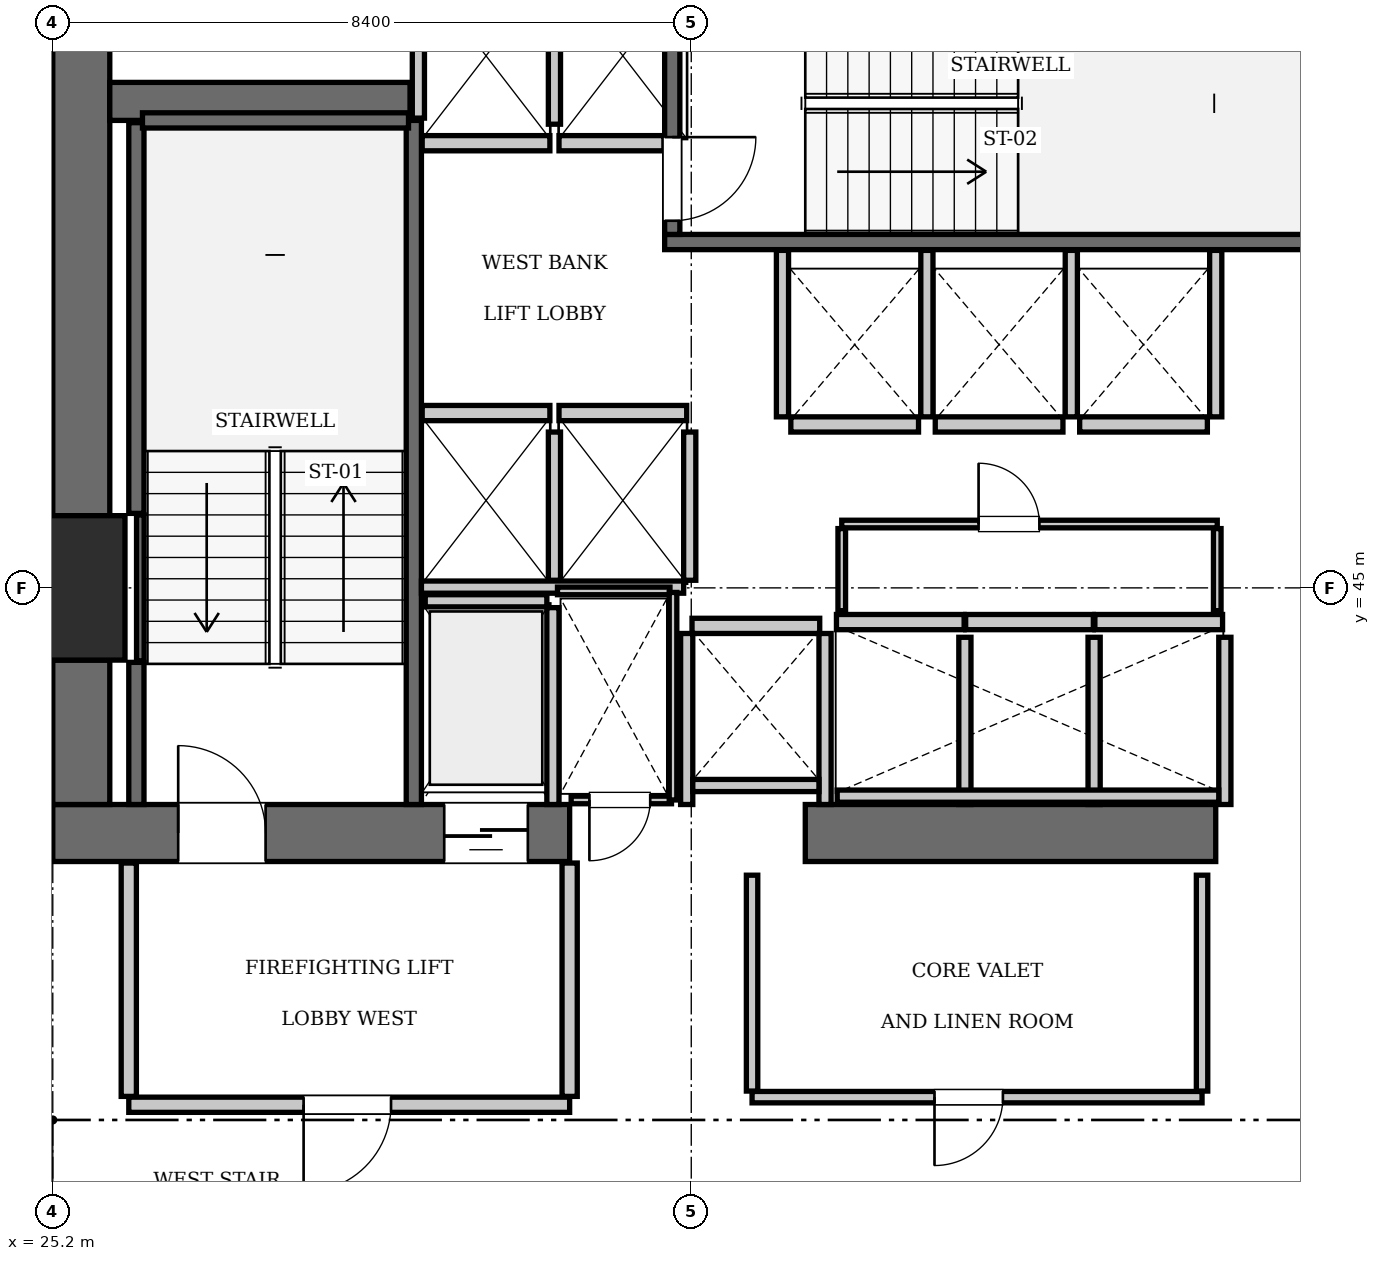
"""IFC4 building model, lengths in metres.
Left out: names, types, materials, properties, quantities, classifications, styles, units other than length and angle.
Written with IfcOpenShell. Run it as: python <this file> out.ifc"""

import sys

from ifc_helpers import new_model, si_unit, direction, frame, frame_2d, origin, origin_2d, place, context, subcontext, project, spatial, rectangle, extrude, element, fill, save


model = new_model("IFC4")
c1 = context("Model", 3, precision=1e-05, world=origin(), true_north=direction((0.0, 1.0)))
c2 = subcontext(c1, "Body", "Model", "MODEL_VIEW")
j1 = project(units=[si_unit("LENGTHUNIT", "METRE"), si_unit("PLANEANGLEUNIT", "RADIAN")], contexts=[c1])
p1 = place(None, origin())
s1 = spatial("IfcSite", under=j1, at=p1, CompositionType="ELEMENT")
p2 = place(p1, origin())
s2 = spatial("IfcBuilding", under=s1, at=p2, CompositionType="ELEMENT")
p3 = place(p2, frame((0.0, 0.0, 127.4)))
s3 = spatial("IfcBuildingStorey", under=s2, at=p3, CompositionType="ELEMENT", Elevation=127.4)
p4 = place(p3, frame((25.2, 45.0, 0.0), z_axis=(0.0, 0.0, 1.0), x_axis=(1.0, 0.0, 0.0)))
e1 = element("IfcColumn", 1, at=p4, inside=s3, PredefinedType="COLUMN", context=c2, shape_type="SweptSolid", body=[
    extrude(rectangle(XDim=1.9, YDim=1.9, at=origin_2d()), origin(), (0.0, 0.0, 1.0), 3.85),
])
p5 = place(p3, frame((25.2, 41.775, 0.0), z_axis=(0.0, 0.0, 1.0), x_axis=(1.0, 0.0, 0.0)))
e2 = element("IfcWall", 2, at=p5, inside=s3, PredefinedType="SHEAR", context=c2, shape_type="SweptSolid", body=[
    extrude(rectangle(XDim=6.8, YDim=0.75, at=frame_2d((3.4, 0.0))), origin(), (0.0, 0.0, 1.0), 3.85),
])
p6 = place(p5, frame((1.65, 0.0, 0.0)))
e3 = element("IfcOpeningElement", 3, at=p6, cuts=e2, PredefinedType="OPENING", context=c2, shape_type="SweptSolid", body=[
    extrude(rectangle(XDim=1.15, YDim=2.15, at=frame_2d((0.575, 1.075))), frame((0.0, 0.385, 0.0), z_axis=(0.0, -1.0, 0.0), x_axis=(1.0, 0.0, 0.0)), (0.0, 0.0, 1.0), 0.77),
])
p7 = place(p5, frame((5.15, 0.0, 0.0)))
e4 = element("IfcOpeningElement", 4, at=p7, cuts=e2, PredefinedType="OPENING", context=c2, shape_type="SweptSolid", body=[
    extrude(rectangle(XDim=1.1, YDim=2.2, at=frame_2d((0.55, 1.1))), frame((0.0, 0.385, 0.0), z_axis=(0.0, -1.0, 0.0), x_axis=(1.0, 0.0, 0.0)), (0.0, 0.0, 1.0), 0.77),
])
p8 = place(p3, frame((35.1, 41.775, 0.0), z_axis=(0.0, 0.0, 1.0), x_axis=(1.0, 0.0, 0.0)))
e5 = element("IfcWall", 5, at=p8, inside=s3, PredefinedType="SHEAR", context=c2, shape_type="SweptSolid", body=[
    extrude(rectangle(XDim=5.4, YDim=0.75, at=frame_2d((2.7, 0.0))), origin(), (0.0, 0.0, 1.0), 3.85),
])
p9 = place(p3, frame((25.575, 42.15, 0.0), z_axis=(0.0, 0.0, 1.0), x_axis=(0.0, 1.0, 0.0)))
e6 = element("IfcWall", 6, at=p9, inside=s3, PredefinedType="SHEAR", context=c2, shape_type="SweptSolid", body=[
    extrude(rectangle(XDim=1.9, YDim=0.75, at=frame_2d((0.95, 0.0))), origin(), (0.0, 0.0, 1.0), 3.85),
])
p10 = place(p3, frame((25.575, 45.95, 0.0), z_axis=(0.0, 0.0, 1.0), x_axis=(0.0, 1.0, 0.0)))
e7 = element("IfcWall", 7, at=p10, inside=s3, PredefinedType="SHEAR", context=c2, shape_type="SweptSolid", body=[
    extrude(rectangle(XDim=7.3, YDim=0.75, at=frame_2d((3.65, 0.0))), origin(), (0.0, 0.0, 1.0), 3.85),
])
p11 = place(p3, frame((25.95, 51.4, 0.0), z_axis=(0.0, 0.0, 1.0), x_axis=(1.0, 0.0, 0.0)))
e8 = element("IfcWall", 8, at=p11, inside=s3, PredefinedType="SHEAR", context=c2, shape_type="SweptSolid", body=[
    extrude(rectangle(XDim=3.95, YDim=0.5, at=frame_2d((1.975, 0.0))), origin(), (0.0, 0.0, 1.0), 3.85),
])
p12 = place(p3, frame((29.95, 42.15, 0.0), z_axis=(0.0, 0.0, 1.0), x_axis=(0.0, 1.0, 0.0)))
e9 = element("IfcWall", 9, at=p12, inside=s3, PredefinedType="SOLIDWALL", context=c2, shape_type="SweptSolid", body=[
    extrude(rectangle(XDim=9.0, YDim=0.2, at=frame_2d((4.5, 0.0))), origin(), (0.0, 0.0, 1.0), 3.61),
])
p13 = place(p3, frame((26.3, 42.15, 0.0), z_axis=(0.0, 0.0, 1.0), x_axis=(0.0, 1.0, 0.0)))
e10 = element("IfcWall", 10, at=p13, inside=s3, PredefinedType="SOLIDWALL", context=c2, shape_type="SweptSolid", body=[
    extrude(rectangle(XDim=1.87, YDim=0.2, at=frame_2d((0.935, 0.0))), origin(), (0.0, 0.0, 1.0), 3.61),
])
p14 = place(p3, frame((26.3, 45.98, 0.0), z_axis=(0.0, 0.0, 1.0), x_axis=(0.0, 1.0, 0.0)))
e11 = element("IfcWall", 11, at=p14, inside=s3, PredefinedType="SOLIDWALL", context=c2, shape_type="SweptSolid", body=[
    extrude(rectangle(XDim=5.14, YDim=0.2, at=frame_2d((2.57, 0.0))), origin(), (0.0, 0.0, 1.0), 3.61),
])
p15 = place(p3, frame((26.38, 51.15, 0.0), z_axis=(0.0, 0.0, 1.0), x_axis=(1.0, 0.0, 0.0)))
e12 = element("IfcWall", 12, at=p15, inside=s3, PredefinedType="SOLIDWALL", context=c2, shape_type="SweptSolid", body=[
    extrude(rectangle(XDim=3.5, YDim=0.2, at=frame_2d((1.75, 0.0))), origin(), (0.0, 0.0, 1.0), 3.61),
])
p16 = place(p3, frame((26.352, 44.04, 0.0), z_axis=(0.0, 0.0, 1.0), x_axis=(0.0, 1.0, 0.0)))
e13 = element("IfcWall", 13, at=p16, inside=s3, PredefinedType="SOLIDWALL", context=c2, shape_type="SweptSolid", body=[
    extrude(rectangle(XDim=1.92, YDim=0.1, at=frame_2d((0.96, 0.0))), origin(), (0.0, 0.0, 1.0), 3.61),
])
p17 = place(p3, frame((33.25, 49.55, 0.0), z_axis=(0.0, 0.0, 1.0), x_axis=(1.0, 0.0, 0.0)))
e14 = element("IfcWall", 14, at=p17, inside=s3, PredefinedType="SOLIDWALL", context=c2, shape_type="SweptSolid", body=[
    extrude(rectangle(XDim=9.1, YDim=0.2, at=frame_2d((4.55, 0.0))), origin(), (0.0, 0.0, 1.0), 3.61),
])
p18 = place(p3, frame((33.35, 49.65, 0.0), z_axis=(0.0, 0.0, 1.0), x_axis=(0.0, 1.0, 0.0)))
e15 = element("IfcWall", 15, at=p18, inside=s3, PredefinedType="SOLIDWALL", context=c2, shape_type="SweptSolid", body=[
    extrude(rectangle(XDim=3.6, YDim=0.2, at=frame_2d((1.8, 0.0))), origin(), (0.0, 0.0, 1.0), 3.61),
])
p19 = place(p18, frame((0.18, 0.0, 0.0)))
e16 = element("IfcOpeningElement", 16, at=p19, cuts=e15, PredefinedType="OPENING", context=c2, shape_type="SweptSolid", body=[
    extrude(rectangle(XDim=1.1, YDim=2.15, at=frame_2d((0.55, 1.075))), frame((0.0, 0.11, 0.0), z_axis=(0.0, -1.0, 0.0), x_axis=(1.0, 0.0, 0.0)), (0.0, 0.0, 1.0), 0.22),
])
for number, where, z_axis, x_axis in (
    (17, (30.06, 47.3, 0.0), (0.0, 0.0, 1.0), (1.0, 0.0, 0.0)),
    (18, (31.86, 47.3, 0.0), (0.0, 0.0, 1.0), (1.0, 0.0, 0.0)),
    (19, (30.06, 50.85, 0.0), (0.0, 0.0, 1.0), (1.0, 0.0, 0.0)),
):
    element("IfcWall", number, at=place(p3, frame(where, z_axis=z_axis, x_axis=x_axis)), inside=s3, PredefinedType="SOLIDWALL", context=c2, shape_type="SweptSolid", body=[
        extrude(rectangle(XDim=1.68, YDim=0.2, at=frame_2d((0.84, 0.0))), origin(), (0.0, 0.0, 1.0), 3.61),
    ])
p20 = place(p3, frame((31.86, 50.85, 0.0), z_axis=(0.0, 0.0, 1.0), x_axis=(1.0, 0.0, 0.0)))
e20 = element("IfcWall", 20, at=p20, inside=s3, PredefinedType="SOLIDWALL", context=c2, shape_type="SweptSolid", body=[
    extrude(rectangle(XDim=1.38, YDim=0.2, at=frame_2d((0.69, 0.0))), origin(), (0.0, 0.0, 1.0), 3.61),
])
for number, where, z_axis, x_axis in (
    (21, (35.51, 44.55, 0.0), (0.0, 0.0, 1.0), (1.0, 0.0, 0.0)),
    (22, (37.21, 44.55, 0.0), (0.0, 0.0, 1.0), (1.0, 0.0, 0.0)),
):
    element("IfcWall", number, at=place(p3, frame(where, z_axis=z_axis, x_axis=x_axis)), inside=s3, PredefinedType="SOLIDWALL", context=c2, shape_type="SweptSolid", body=[
        extrude(rectangle(XDim=1.68, YDim=0.2, at=frame_2d((0.84, 0.0))), origin(), (0.0, 0.0, 1.0), 3.61),
    ])
for number, where, z_axis, x_axis in (
    (23, (38.91, 44.55, 0.0), (0.0, 0.0, 1.0), (1.0, 0.0, 0.0)),
    (24, (34.91, 47.15, 0.0), (0.0, 0.0, 1.0), (1.0, 0.0, 0.0)),
):
    element("IfcWall", number, at=place(p3, frame(where, z_axis=z_axis, x_axis=x_axis)), inside=s3, PredefinedType="SOLIDWALL", context=c2, shape_type="SweptSolid", body=[
        extrude(rectangle(XDim=1.68, YDim=0.2, at=frame_2d((0.84, 0.0))), origin(), (0.0, 0.0, 1.0), 3.61),
    ])
for number, where, z_axis, x_axis in (
    (25, (36.81, 47.15, 0.0), (0.0, 0.0, 1.0), (1.0, 0.0, 0.0)),
    (26, (38.71, 47.15, 0.0), (0.0, 0.0, 1.0), (1.0, 0.0, 0.0)),
    (27, (33.61, 44.5, 0.0), (0.0, 0.0, 1.0), (1.0, 0.0, 0.0)),
):
    element("IfcWall", number, at=place(p3, frame(where, z_axis=z_axis, x_axis=x_axis)), inside=s3, PredefinedType="SOLIDWALL", context=c2, shape_type="SweptSolid", body=[
        extrude(rectangle(XDim=1.68, YDim=0.2, at=frame_2d((0.84, 0.0))), origin(), (0.0, 0.0, 1.0), 3.61),
    ])
p21 = place(p3, frame((30.1, 44.83, 0.0), z_axis=(0.0, 0.0, 1.0), x_axis=(1.0, 0.0, 0.0)))
e28 = element("IfcWall", 28, at=p21, inside=s3, PredefinedType="SOLIDWALL", context=c2, shape_type="SweptSolid", body=[
    extrude(rectangle(XDim=1.6, YDim=0.16, at=frame_2d((0.8, 0.0))), origin(), (0.0, 0.0, 1.0), 3.61),
])
p22 = place(p3, frame((31.78, 42.15, 0.0), z_axis=(0.0, 0.0, 1.0), x_axis=(0.0, 1.0, 0.0)))
e29 = element("IfcWall", 29, at=p22, inside=s3, PredefinedType="SOLIDWALL", context=c2, shape_type="SweptSolid", body=[
    extrude(rectangle(XDim=2.59, YDim=0.16, at=frame_2d((1.295, 0.0))), origin(), (0.0, 0.0, 1.0), 3.61),
])
for number, where, z_axis, x_axis in (
    (30, (31.8, 45.1, 0.0), (0.0, 0.0, 1.0), (0.0, 1.0, 0.0)),
    (31, (33.58, 45.1, 0.0), (0.0, 0.0, 1.0), (0.0, 1.0, 0.0)),
):
    element("IfcWall", number, at=place(p3, frame(where, z_axis=z_axis, x_axis=x_axis)), inside=s3, PredefinedType="SOLIDWALL", context=c2, shape_type="SweptSolid", body=[
        extrude(rectangle(XDim=1.95, YDim=0.16, at=frame_2d((0.975, 0.0))), origin(), (0.0, 0.0, 1.0), 3.61),
    ])
p23 = place(p3, frame((30.05, 45.01, 0.0), z_axis=(0.0, 0.0, 1.0), x_axis=(1.0, 0.0, 0.0)))
e32 = element("IfcWall", 32, at=p23, inside=s3, PredefinedType="SOLIDWALL", context=c2, shape_type="SweptSolid", body=[
    extrude(rectangle(XDim=3.45, YDim=0.16, at=frame_2d((1.725, 0.0))), origin(), (0.0, 0.0, 1.0), 3.61),
])
p24 = place(p3, frame((30.01, 51.18, 0.0), z_axis=(0.0, 0.0, 1.0), x_axis=(0.0, 1.0, 0.0)))
e33 = element("IfcWall", 33, at=p24, inside=s3, PredefinedType="SOLIDWALL", context=c2, shape_type="SweptSolid", body=[
    extrude(rectangle(XDim=2.07, YDim=0.16, at=frame_2d((1.035, 0.0))), origin(), (0.0, 0.0, 1.0), 3.61),
])
p25 = place(p3, frame((31.8, 51.1, 0.0), z_axis=(0.0, 0.0, 1.0), x_axis=(0.0, 1.0, 0.0)))
e34 = element("IfcWall", 34, at=p25, inside=s3, PredefinedType="SOLIDWALL", context=c2, shape_type="SweptSolid", body=[
    extrude(rectangle(XDim=2.15, YDim=0.16, at=frame_2d((1.075, 0.0))), origin(), (0.0, 0.0, 1.0), 3.61),
])
for number, where, z_axis, x_axis in (
    (35, (37.2, 42.15, 0.0), (0.0, 0.0, 1.0), (0.0, 1.0, 0.0)),
    (36, (38.9, 42.15, 0.0), (0.0, 0.0, 1.0), (0.0, 1.0, 0.0)),
    (37, (40.62, 42.15, 0.0), (0.0, 0.0, 1.0), (0.0, 1.0, 0.0)),
):
    element("IfcWall", number, at=place(p3, frame(where, z_axis=z_axis, x_axis=x_axis)), inside=s3, PredefinedType="SOLIDWALL", context=c2, shape_type="SweptSolid", body=[
        extrude(rectangle(XDim=2.2, YDim=0.16, at=frame_2d((1.1, 0.0))), origin(), (0.0, 0.0, 1.0), 3.61),
    ])
p26 = place(p3, frame((35.52, 42.26, 0.0), z_axis=(0.0, 0.0, 1.0), x_axis=(1.0, 0.0, 0.0)))
e38 = element("IfcWall", 38, at=p26, inside=s3, PredefinedType="SOLIDWALL", context=c2, shape_type="SweptSolid", body=[
    extrude(rectangle(XDim=5.02, YDim=0.16, at=frame_2d((2.51, 0.0))), origin(), (0.0, 0.0, 1.0), 3.61),
])
for number, where, z_axis, x_axis in (
    (39, (34.8, 47.25, 0.0), (0.0, 0.0, 1.0), (0.0, 1.0, 0.0)),
    (40, (36.7, 47.25, 0.0), (0.0, 0.0, 1.0), (0.0, 1.0, 0.0)),
    (41, (38.6, 47.25, 0.0), (0.0, 0.0, 1.0), (0.0, 1.0, 0.0)),
    (42, (40.5, 47.25, 0.0), (0.0, 0.0, 1.0), (0.0, 1.0, 0.0)),
):
    element("IfcWall", number, at=place(p3, frame(where, z_axis=z_axis, x_axis=x_axis)), inside=s3, PredefinedType="SOLIDWALL", context=c2, shape_type="SweptSolid", body=[
        extrude(rectangle(XDim=2.19, YDim=0.16, at=frame_2d((1.095, 0.0))), origin(), (0.0, 0.0, 1.0), 3.61),
    ])
for number, where, z_axis, x_axis in (
    (43, (33.54, 42.15, 0.0), (0.0, 0.0, 1.0), (0.0, 1.0, 0.0)),
    (44, (35.36, 42.15, 0.0), (0.0, 0.0, 1.0), (0.0, 1.0, 0.0)),
):
    element("IfcWall", number, at=place(p3, frame(where, z_axis=z_axis, x_axis=x_axis)), inside=s3, PredefinedType="SOLIDWALL", context=c2, shape_type="SweptSolid", body=[
        extrude(rectangle(XDim=2.25, YDim=0.16, at=frame_2d((1.125, 0.0))), origin(), (0.0, 0.0, 1.0), 3.61),
    ])
p27 = place(p3, frame((33.62, 42.4, 0.0), z_axis=(0.0, 0.0, 1.0), x_axis=(1.0, 0.0, 0.0)))
e45 = element("IfcWall", 45, at=p27, inside=s3, PredefinedType="SOLIDWALL", context=c2, shape_type="SweptSolid", body=[
    extrude(rectangle(XDim=1.66, YDim=0.16, at=frame_2d((0.83, 0.0))), origin(), (0.0, 0.0, 1.0), 3.61),
])
p28 = place(p3, frame((26.2, 38.2, 0.0), z_axis=(0.0, 0.0, 1.0), x_axis=(1.0, 0.0, 0.0)))
e46 = element("IfcWall", 46, at=p28, inside=s3, PredefinedType="PARTITIONING", context=c2, shape_type="SweptSolid", body=[
    extrude(rectangle(XDim=5.8, YDim=0.2, at=frame_2d((2.9, 0.0))), origin(), (0.0, 0.0, 1.0), 3.61),
])
p29 = place(p28, frame((2.3, 0.0, 0.0)))
e47 = element("IfcOpeningElement", 47, at=p29, cuts=e46, PredefinedType="OPENING", context=c2, shape_type="SweptSolid", body=[
    extrude(rectangle(XDim=1.15, YDim=2.15, at=frame_2d((0.575, 1.075))), frame((0.0, 0.11, 0.0), z_axis=(0.0, -1.0, 0.0), x_axis=(1.0, 0.0, 0.0)), (0.0, 0.0, 1.0), 0.22),
])
for number, where, z_axis, x_axis in (
    (48, (26.2, 38.31, 0.0), (0.0, 0.0, 1.0), (0.0, 1.0, 0.0)),
    (49, (32.0, 38.31, 0.0), (0.0, 0.0, 1.0), (0.0, 1.0, 0.0)),
):
    element("IfcWall", number, at=place(p3, frame(where, z_axis=z_axis, x_axis=x_axis)), inside=s3, PredefinedType="PARTITIONING", context=c2, shape_type="SweptSolid", body=[
        extrude(rectangle(XDim=3.07, YDim=0.2, at=frame_2d((1.535, 0.0))), origin(), (0.0, 0.0, 1.0), 3.61),
    ])
p30 = place(p3, frame((32.02, 42.21, 0.0), z_axis=(0.0, 0.0, 1.0), x_axis=(1.0, 0.0, 0.0)))
e50 = element("IfcWall", 50, at=p30, inside=s3, PredefinedType="PARTITIONING", context=c2, shape_type="SweptSolid", body=[
    extrude(rectangle(XDim=1.32, YDim=0.1, at=frame_2d((0.66, 0.0))), origin(), (0.0, 0.0, 1.0), 3.61),
])
p31 = place(p30, frame((0.24, 0.0, 0.0)))
e51 = element("IfcOpeningElement", 51, at=p31, cuts=e50, PredefinedType="OPENING", context=c2, shape_type="SweptSolid", body=[
    extrude(rectangle(XDim=0.8, YDim=2.05, at=frame_2d((0.4, 1.025))), frame((0.0, 0.06, 0.0), z_axis=(0.0, -1.0, 0.0), x_axis=(1.0, 0.0, 0.0)), (0.0, 0.0, 1.0), 0.12),
])
p32 = place(p3, frame((31.84, 44.96, 0.0), z_axis=(0.0, 0.0, 1.0), x_axis=(1.0, 0.0, 0.0)))
e52 = element("IfcWall", 52, at=p32, inside=s3, PredefinedType="PARTITIONING", context=c2, shape_type="SweptSolid", body=[
    extrude(rectangle(XDim=1.48, YDim=0.1, at=frame_2d((0.74, 0.0))), origin(), (0.0, 0.0, 1.0), 3.61),
])
p33 = place(p3, frame((33.36, 42.21, 0.0), z_axis=(0.0, 0.0, 1.0), x_axis=(0.0, 1.0, 0.0)))
e53 = element("IfcWall", 53, at=p33, inside=s3, PredefinedType="PARTITIONING", context=c2, shape_type="SweptSolid", body=[
    extrude(rectangle(XDim=2.73, YDim=0.1, at=frame_2d((1.365, 0.0))), origin(), (0.0, 0.0, 1.0), 3.61),
])
p34 = place(p3, frame((35.58, 45.84, 0.0), z_axis=(0.0, 0.0, 1.0), x_axis=(1.0, 0.0, 0.0)))
e54 = element("IfcWall", 54, at=p34, inside=s3, PredefinedType="PARTITIONING", context=c2, shape_type="SweptSolid", body=[
    extrude(rectangle(XDim=4.94, YDim=0.1, at=frame_2d((2.47, 0.0))), origin(), (0.0, 0.0, 1.0), 3.61),
])
p35 = place(p34, frame((1.8, 0.0, 0.0)))
e55 = element("IfcOpeningElement", 55, at=p35, cuts=e54, PredefinedType="OPENING", context=c2, shape_type="SweptSolid", body=[
    extrude(rectangle(XDim=0.8, YDim=2.05, at=frame_2d((0.4, 1.025))), frame((0.0, 0.06, 0.0), z_axis=(0.0, -1.0, 0.0), x_axis=(1.0, 0.0, 0.0)), (0.0, 0.0, 1.0), 0.12),
])
for number, where, z_axis, x_axis in (
    (56, (35.58, 44.7, 0.0), (0.0, 0.0, 1.0), (0.0, 1.0, 0.0)),
    (57, (40.52, 44.7, 0.0), (0.0, 0.0, 1.0), (0.0, 1.0, 0.0)),
):
    element("IfcWall", number, at=place(p3, frame(where, z_axis=z_axis, x_axis=x_axis)), inside=s3, PredefinedType="PARTITIONING", context=c2, shape_type="SweptSolid", body=[
        extrude(rectangle(XDim=1.08, YDim=0.1, at=frame_2d((0.54, 0.0))), origin(), (0.0, 0.0, 1.0), 3.61),
    ])
p36 = place(p3, frame((34.4, 38.3, 0.0), z_axis=(0.0, 0.0, 1.0), x_axis=(1.0, 0.0, 0.0)))
e58 = element("IfcWall", 58, at=p36, inside=s3, PredefinedType="PARTITIONING", context=c2, shape_type="SweptSolid", body=[
    extrude(rectangle(XDim=5.92, YDim=0.15, at=frame_2d((2.96, 0.0))), origin(), (0.0, 0.0, 1.0), 3.61),
])
p37 = place(p36, frame((2.4, 0.0, 0.0)))
e59 = element("IfcOpeningElement", 59, at=p37, cuts=e58, PredefinedType="OPENING", context=c2, shape_type="SweptSolid", body=[
    extrude(rectangle(XDim=0.9, YDim=2.1, at=frame_2d((0.45, 1.05))), frame((0.0, 0.085, 0.0), z_axis=(0.0, -1.0, 0.0), x_axis=(1.0, 0.0, 0.0)), (0.0, 0.0, 1.0), 0.17),
])
for number, where, z_axis, x_axis in (
    (60, (34.4, 38.38, 0.0), (0.0, 0.0, 1.0), (0.0, 1.0, 0.0)),
    (61, (40.32, 38.38, 0.0), (0.0, 0.0, 1.0), (0.0, 1.0, 0.0)),
):
    element("IfcWall", number, at=place(p3, frame(where, z_axis=z_axis, x_axis=x_axis)), inside=s3, PredefinedType="PARTITIONING", context=c2, shape_type="SweptSolid", body=[
        extrude(rectangle(XDim=2.84, YDim=0.15, at=frame_2d((1.42, 0.0))), origin(), (0.0, 0.0, 1.0), 3.61),
    ])
p38 = place(p6, origin())
e62 = element("IfcDoor", 62, at=p38, inside=s3, OperationType="SINGLE_SWING_LEFT", PredefinedType="DOOR", context=c2, shape_type="SweptSolid", body=[
    extrude(rectangle(XDim=1.15, YDim=2.15, at=frame_2d((0.575, 1.075))), frame((0.0, 0.025, 0.0), z_axis=(0.0, -1.0, 0.0), x_axis=(1.0, 0.0, 0.0)), (0.0, 0.0, 1.0), 0.05),
])
fill(e3, e62)
p39 = place(p19, frame((1.1, 0.0, 0.0), z_axis=(0.0, 0.0, 1.0), x_axis=(-1.0, 0.0, 0.0)))
e63 = element("IfcDoor", 63, at=p39, inside=s3, OperationType="SINGLE_SWING_LEFT", PredefinedType="DOOR", context=c2, shape_type="SweptSolid", body=[
    extrude(rectangle(XDim=1.1, YDim=2.15, at=frame_2d((0.55, 1.075))), frame((0.0, 0.025, 0.0), z_axis=(0.0, -1.0, 0.0), x_axis=(1.0, 0.0, 0.0)), (0.0, 0.0, 1.0), 0.05),
])
fill(e16, e63)
p40 = place(p7, frame((1.1, 0.0, 0.0), z_axis=(0.0, 0.0, 1.0), x_axis=(-1.0, 0.0, 0.0)))
e64 = element("IfcDoor", 64, at=p40, inside=s3, OperationType="SLIDING_TO_LEFT", PredefinedType="DOOR", context=c2, shape_type="SweptSolid", body=[
    extrude(rectangle(XDim=1.1, YDim=2.2, at=frame_2d((0.55, 1.1))), frame((0.0, 0.025, 0.0), z_axis=(0.0, -1.0, 0.0), x_axis=(1.0, 0.0, 0.0)), (0.0, 0.0, 1.0), 0.05),
])
fill(e4, e64)
p41 = place(p29, frame((1.15, 0.0, 0.0), z_axis=(0.0, 0.0, 1.0), x_axis=(-1.0, 0.0, 0.0)))
e65 = element("IfcDoor", 65, at=p41, inside=s3, OperationType="SINGLE_SWING_RIGHT", PredefinedType="DOOR", context=c2, shape_type="SweptSolid", body=[
    extrude(rectangle(XDim=1.15, YDim=2.15, at=frame_2d((0.575, 1.075))), frame((0.0, 0.025, 0.0), z_axis=(0.0, -1.0, 0.0), x_axis=(1.0, 0.0, 0.0)), (0.0, 0.0, 1.0), 0.05),
])
fill(e47, e65)
p42 = place(p31, frame((0.8, 0.0, 0.0), z_axis=(0.0, 0.0, 1.0), x_axis=(-1.0, 0.0, 0.0)))
e66 = element("IfcDoor", 66, at=p42, inside=s3, OperationType="SINGLE_SWING_RIGHT", PredefinedType="DOOR", context=c2, shape_type="SweptSolid", body=[
    extrude(rectangle(XDim=0.8, YDim=2.05, at=frame_2d((0.4, 1.025))), frame((0.0, 0.025, 0.0), z_axis=(0.0, -1.0, 0.0), x_axis=(1.0, 0.0, 0.0)), (0.0, 0.0, 1.0), 0.05),
])
fill(e51, e66)
p43 = place(p35, origin())
e67 = element("IfcDoor", 67, at=p43, inside=s3, OperationType="SINGLE_SWING_LEFT", PredefinedType="DOOR", context=c2, shape_type="SweptSolid", body=[
    extrude(rectangle(XDim=0.8, YDim=2.05, at=frame_2d((0.4, 1.025))), frame((0.0, 0.025, 0.0), z_axis=(0.0, -1.0, 0.0), x_axis=(1.0, 0.0, 0.0)), (0.0, 0.0, 1.0), 0.05),
])
fill(e55, e67)
p44 = place(p37, frame((0.9, 0.0, 0.0), z_axis=(0.0, 0.0, 1.0), x_axis=(-1.0, 0.0, 0.0)))
e68 = element("IfcDoor", 68, at=p44, inside=s3, OperationType="SINGLE_SWING_RIGHT", PredefinedType="DOOR", context=c2, shape_type="SweptSolid", body=[
    extrude(rectangle(XDim=0.9, YDim=2.1, at=frame_2d((0.45, 1.05))), frame((0.0, 0.025, 0.0), z_axis=(0.0, -1.0, 0.0), x_axis=(1.0, 0.0, 0.0)), (0.0, 0.0, 1.0), 0.05),
])
fill(e59, e68)
save(model, sys.argv[1])
